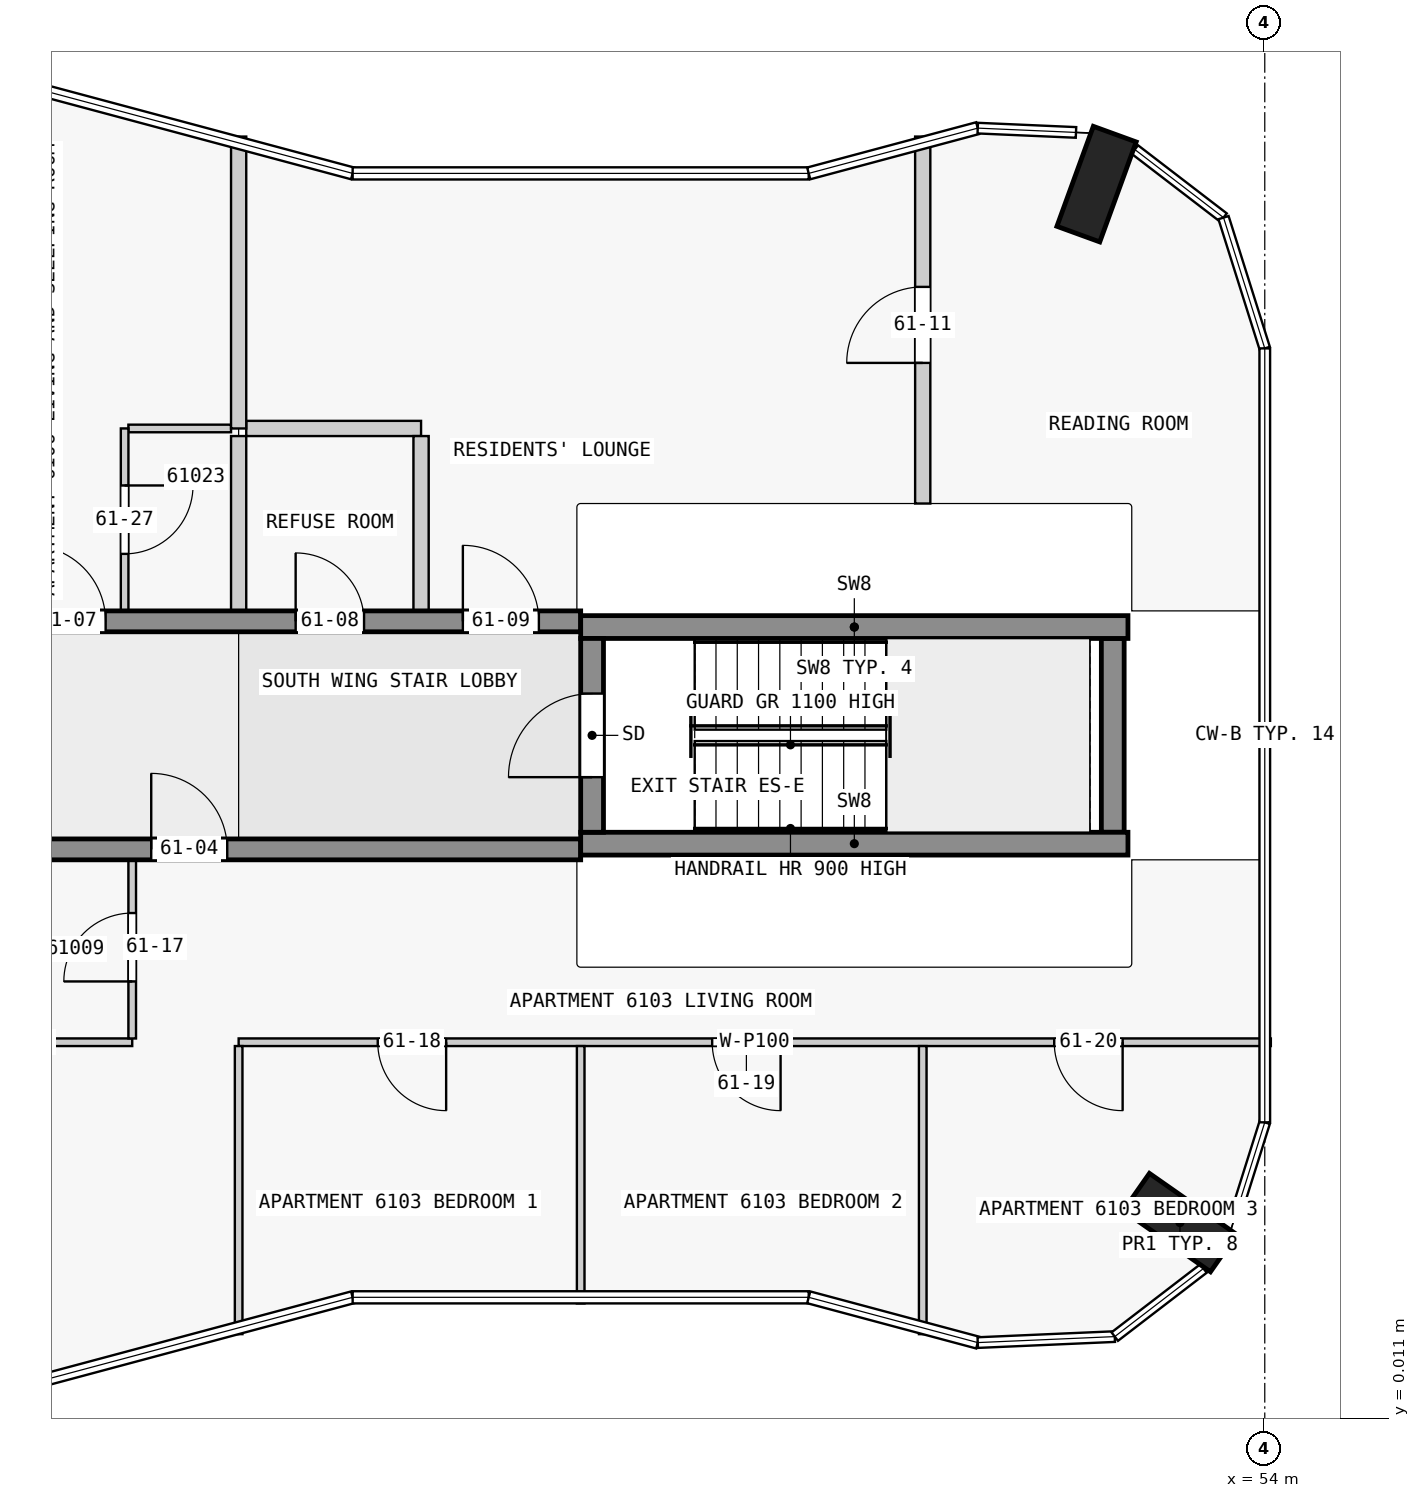
"""IFC4 building model, lengths in metres.
Left out: names, types, materials, properties, quantities, classifications, styles, units other than length and angle.
Written with IfcOpenShell. Run it as: python <this file> out.ifc"""

import sys

from ifc_helpers import new_model, si_unit, direction, frame, frame_2d, origin, origin_2d, place, context, subcontext, project, spatial, rectangle, extrude, element, fill, save


model = new_model("IFC4")
c1 = context("Model", 3, precision=1e-05, world=origin(), true_north=direction((0.0, 1.0)))
c2 = subcontext(c1, "Body", "Model", "MODEL_VIEW")
j1 = project(units=[si_unit("LENGTHUNIT", "METRE"), si_unit("PLANEANGLEUNIT", "RADIAN")], contexts=[c1])
p1 = place(None, origin())
s1 = spatial("IfcSite", under=j1, at=p1, CompositionType="ELEMENT")
p2 = place(p1, origin())
s2 = spatial("IfcBuilding", under=s1, at=p2, CompositionType="ELEMENT")
p3 = place(p2, frame((0.0, 0.0, 232.9)))
s3 = spatial("IfcBuildingStorey", under=s2, at=p3, CompositionType="ELEMENT", Elevation=232.9)
for number, where, z_axis, x_axis in (
    (1, (52.884, 2.59, 0.0), (0.0, 0.0, 1.0), (0.574, 0.819, 0.0)),
    (2, (51.787, 16.252, 0.0), (0.0, 0.0, 1.0), (-0.94, 0.342, 0.0)),
):
    element("IfcColumn", number, at=place(p3, frame(where, z_axis=z_axis, x_axis=x_axis)), inside=s3, PredefinedType="COLUMN", context=c2, shape_type="SweptSolid", body=[
        extrude(rectangle(XDim=0.6, YDim=1.4, at=origin_2d()), origin(), (0.0, 0.0, 1.0), 3.5),
    ])
p4 = place(p3, frame((45.15, 7.725, 0.0), z_axis=(0.0, 0.0, 1.0), x_axis=(0.0, 1.0, 0.0)))
e3 = element("IfcWall", 3, at=p4, inside=s3, PredefinedType="SHEAR", context=c2, shape_type="SweptSolid", body=[
    extrude(rectangle(XDim=2.55, YDim=0.3, at=frame_2d((1.275, 0.0))), origin(), (0.0, 0.0, 1.0), 3.5),
])
p5 = place(p4, frame((0.725, 0.0, 0.0)))
e4 = element("IfcOpeningElement", 4, at=p5, cuts=e3, PredefinedType="OPENING", context=c2, shape_type="SweptSolid", body=[
    extrude(rectangle(XDim=1.1, YDim=2.1, at=frame_2d((0.55, 1.05))), frame((0.0, 0.16, 0.0), z_axis=(0.0, -1.0, 0.0), x_axis=(1.0, 0.0, 0.0)), (0.0, 0.0, 1.0), 0.32),
])
p6 = place(p3, frame((52.0, 7.725, 0.0), z_axis=(0.0, 0.0, 1.0), x_axis=(0.0, 1.0, 0.0)))
e5 = element("IfcWall", 5, at=p6, inside=s3, PredefinedType="SHEAR", context=c2, shape_type="SweptSolid", body=[
    extrude(rectangle(XDim=2.55, YDim=0.3, at=frame_2d((1.275, 0.0))), origin(), (0.0, 0.0, 1.0), 3.5),
])
for number, where, z_axis, x_axis in (
    (6, (45.0, 7.575, 0.0), (0.0, 0.0, 1.0), (1.0, 0.0, 0.0)),
    (7, (45.0, 10.425, 0.0), (0.0, 0.0, 1.0), (1.0, 0.0, 0.0)),
):
    element("IfcWall", number, at=place(p3, frame(where, z_axis=z_axis, x_axis=x_axis)), inside=s3, PredefinedType="SHEAR", context=c2, shape_type="SweptSolid", body=[
        extrude(rectangle(XDim=7.2, YDim=0.3, at=frame_2d((3.6, 0.0))), origin(), (0.0, 0.0, 1.0), 3.5),
    ])
p7 = place(p3, frame((22.5, 7.5, 0.0), z_axis=(0.0, 0.0, 1.0), x_axis=(1.0, 0.0, 0.0)))
e8 = element("IfcWall", 8, at=p7, inside=s3, PredefinedType="SHEAR", context=c2, shape_type="SweptSolid", body=[
    extrude(rectangle(XDim=22.5, YDim=0.275, at=frame_2d((11.25, 0.0))), origin(), (0.0, 0.0, 1.0), 3.2),
])
p8 = place(p7, frame((1.75, 0.0, 0.0)))
e9 = element("IfcOpeningElement", 9, at=p8, cuts=e8, PredefinedType="OPENING", context=c2, shape_type="SweptSolid", body=[
    extrude(rectangle(XDim=1.0, YDim=2.1, at=frame_2d((0.5, 1.05))), frame((0.0, 0.147, 0.0), z_axis=(0.0, -1.0, 0.0), x_axis=(1.0, 0.0, 0.0)), (0.0, 0.0, 1.0), 0.295),
])
p9 = place(p7, frame((5.85, 0.0, 0.0)))
e10 = element("IfcOpeningElement", 10, at=p9, cuts=e8, PredefinedType="OPENING", context=c2, shape_type="SweptSolid", body=[
    extrude(rectangle(XDim=1.8, YDim=2.1, at=frame_2d((0.9, 1.05))), frame((0.0, 0.147, 0.0), z_axis=(0.0, -1.0, 0.0), x_axis=(1.0, 0.0, 0.0)), (0.0, 0.0, 1.0), 0.295),
])
p10 = place(p7, frame((10.75, 0.0, 0.0)))
e11 = element("IfcOpeningElement", 11, at=p10, cuts=e8, PredefinedType="OPENING", context=c2, shape_type="SweptSolid", body=[
    extrude(rectangle(XDim=1.0, YDim=2.1, at=frame_2d((0.5, 1.05))), frame((0.0, 0.147, 0.0), z_axis=(0.0, -1.0, 0.0), x_axis=(1.0, 0.0, 0.0)), (0.0, 0.0, 1.0), 0.295),
])
p11 = place(p7, frame((16.85, 0.0, 0.0)))
e12 = element("IfcOpeningElement", 12, at=p11, cuts=e8, PredefinedType="OPENING", context=c2, shape_type="SweptSolid", body=[
    extrude(rectangle(XDim=1.0, YDim=2.1, at=frame_2d((0.5, 1.05))), frame((0.0, 0.147, 0.0), z_axis=(0.0, -1.0, 0.0), x_axis=(1.0, 0.0, 0.0)), (0.0, 0.0, 1.0), 0.295),
])
p12 = place(p3, frame((22.5, 10.5, 0.0), z_axis=(0.0, 0.0, 1.0), x_axis=(1.0, 0.0, 0.0)))
e13 = element("IfcWall", 13, at=p12, inside=s3, PredefinedType="SHEAR", context=c2, shape_type="SweptSolid", body=[
    extrude(rectangle(XDim=22.5, YDim=0.275, at=frame_2d((11.25, 0.0))), origin(), (0.0, 0.0, 1.0), 3.2),
])
p13 = place(p12, frame((4.05, 0.0, 0.0)))
e14 = element("IfcOpeningElement", 14, at=p13, cuts=e13, PredefinedType="OPENING", context=c2, shape_type="SweptSolid", body=[
    extrude(rectangle(XDim=1.0, YDim=2.1, at=frame_2d((0.5, 1.05))), frame((0.0, 0.147, 0.0), z_axis=(0.0, -1.0, 0.0), x_axis=(1.0, 0.0, 0.0)), (0.0, 0.0, 1.0), 0.295),
])
p14 = place(p12, frame((10.75, 0.0, 0.0)))
e15 = element("IfcOpeningElement", 15, at=p14, cuts=e13, PredefinedType="OPENING", context=c2, shape_type="SweptSolid", body=[
    extrude(rectangle(XDim=1.0, YDim=2.1, at=frame_2d((0.5, 1.05))), frame((0.0, 0.147, 0.0), z_axis=(0.0, -1.0, 0.0), x_axis=(1.0, 0.0, 0.0)), (0.0, 0.0, 1.0), 0.295),
])
p15 = place(p12, frame((15.25, 0.0, 0.0)))
e16 = element("IfcOpeningElement", 16, at=p15, cuts=e13, PredefinedType="OPENING", context=c2, shape_type="SweptSolid", body=[
    extrude(rectangle(XDim=1.0, YDim=2.1, at=frame_2d((0.5, 1.05))), frame((0.0, 0.147, 0.0), z_axis=(0.0, -1.0, 0.0), x_axis=(1.0, 0.0, 0.0)), (0.0, 0.0, 1.0), 0.295),
])
p16 = place(p12, frame((18.75, 0.0, 0.0)))
e17 = element("IfcOpeningElement", 17, at=p16, cuts=e13, PredefinedType="OPENING", context=c2, shape_type="SweptSolid", body=[
    extrude(rectangle(XDim=0.9, YDim=2.1, at=frame_2d((0.45, 1.05))), frame((0.0, 0.147, 0.0), z_axis=(0.0, -1.0, 0.0), x_axis=(1.0, 0.0, 0.0)), (0.0, 0.0, 1.0), 0.295),
])
p17 = place(p12, frame((20.95, 0.0, 0.0)))
e18 = element("IfcOpeningElement", 18, at=p17, cuts=e13, PredefinedType="OPENING", context=c2, shape_type="SweptSolid", body=[
    extrude(rectangle(XDim=1.0, YDim=2.1, at=frame_2d((0.5, 1.05))), frame((0.0, 0.147, 0.0), z_axis=(0.0, -1.0, 0.0), x_axis=(1.0, 0.0, 0.0)), (0.0, 0.0, 1.0), 0.295),
])
p18 = place(p3, frame((54.08, 4.962, 0.0), z_axis=(0.0, 0.0, 1.0), x_axis=(-1.0, 0.0, 0.0)))
e19 = element("IfcWall", 19, at=p18, inside=s3, PredefinedType="PARTITIONING", context=c2, shape_type="SweptSolid", body=[
    extrude(rectangle(XDim=13.58, YDim=0.1, at=frame_2d((6.79, 0.0))), origin(), (0.0, 0.0, 1.0), 3.2),
])
p19 = place(p18, frame((10.85, 0.0, 0.0)))
e20 = element("IfcOpeningElement", 20, at=p19, cuts=e19, PredefinedType="OPENING", context=c2, shape_type="SweptSolid", body=[
    extrude(rectangle(XDim=0.9, YDim=2.1, at=frame_2d((0.45, 1.05))), frame((0.0, 0.06, 0.0), z_axis=(0.0, -1.0, 0.0), x_axis=(1.0, 0.0, 0.0)), (0.0, 0.0, 1.0), 0.12),
])
p20 = place(p18, frame((6.45, 0.0, 0.0)))
e21 = element("IfcOpeningElement", 21, at=p20, cuts=e19, PredefinedType="OPENING", context=c2, shape_type="SweptSolid", body=[
    extrude(rectangle(XDim=0.9, YDim=2.1, at=frame_2d((0.45, 1.05))), frame((0.0, 0.06, 0.0), z_axis=(0.0, -1.0, 0.0), x_axis=(1.0, 0.0, 0.0)), (0.0, 0.0, 1.0), 0.12),
])
p21 = place(p18, frame((1.95, 0.0, 0.0)))
e22 = element("IfcOpeningElement", 22, at=p21, cuts=e19, PredefinedType="OPENING", context=c2, shape_type="SweptSolid", body=[
    extrude(rectangle(XDim=0.9, YDim=2.1, at=frame_2d((0.45, 1.05))), frame((0.0, 0.06, 0.0), z_axis=(0.0, -1.0, 0.0), x_axis=(1.0, 0.0, 0.0)), (0.0, 0.0, 1.0), 0.12),
])
p22 = place(p3, frame((36.1, 4.962, 0.0), z_axis=(0.0, 0.0, 1.0), x_axis=(1.0, 0.0, 0.0)))
e23 = element("IfcWall", 23, at=p22, inside=s3, PredefinedType="PARTITIONING", context=c2, shape_type="SweptSolid", body=[
    extrude(rectangle(XDim=3.0, YDim=0.1, at=frame_2d((1.5, 0.0))), origin(), (0.0, 0.0, 1.0), 3.2),
])
p23 = place(p22, frame((0.35, 0.0, 0.0)))
e24 = element("IfcOpeningElement", 24, at=p23, cuts=e23, PredefinedType="OPENING", context=c2, shape_type="SweptSolid", body=[
    extrude(rectangle(XDim=0.9, YDim=2.1, at=frame_2d((0.45, 1.05))), frame((0.0, 0.06, 0.0), z_axis=(0.0, -1.0, 0.0), x_axis=(1.0, 0.0, 0.0)), (0.0, 0.0, 1.0), 0.12),
])
p24 = place(p3, frame((40.4, 13.038, 0.0), z_axis=(0.0, 0.0, 1.0), x_axis=(-1.0, 0.0, 0.0)))
e25 = element("IfcWall", 25, at=p24, inside=s3, PredefinedType="PARTITIONING", context=c2, shape_type="SweptSolid", body=[
    extrude(rectangle(XDim=1.35, YDim=0.1, at=frame_2d((0.675, 0.0))), origin(), (0.0, 0.0, 1.0), 3.2),
])
p25 = place(p3, frame((42.9, 13.038, 0.0), z_axis=(0.0, 0.0, 1.0), x_axis=(-1.0, 0.0, 0.0)))
e26 = element("IfcWall", 26, at=p25, inside=s3, PredefinedType="PARTITIONING", context=c2, shape_type="SweptSolid", body=[
    extrude(rectangle(XDim=2.3, YDim=0.2, at=frame_2d((1.15, 0.0))), origin(), (0.0, 0.0, 1.0), 3.2),
])
p26 = place(p3, frame((39.0, 13.038, 0.0), z_axis=(0.0, 0.0, 1.0), x_axis=(0.0, -1.0, 0.0)))
e27 = element("IfcWall", 27, at=p26, inside=s3, PredefinedType="PARTITIONING", context=c2, shape_type="SweptSolid", body=[
    extrude(rectangle(XDim=2.4, YDim=0.1, at=frame_2d((1.2, 0.0))), origin(), (0.0, 0.0, 1.0), 3.2),
])
p27 = place(p26, frame((0.75, 0.0, 0.0)))
e28 = element("IfcOpeningElement", 28, at=p27, cuts=e27, PredefinedType="OPENING", context=c2, shape_type="SweptSolid", body=[
    extrude(rectangle(XDim=0.9, YDim=2.1, at=frame_2d((0.45, 1.05))), frame((0.0, 0.06, 0.0), z_axis=(0.0, -1.0, 0.0), x_axis=(1.0, 0.0, 0.0)), (0.0, 0.0, 1.0), 0.12),
])
p28 = place(p3, frame((39.1, 5.012, 0.0), z_axis=(0.0, 0.0, 1.0), x_axis=(0.0, 1.0, 0.0)))
e29 = element("IfcWall", 29, at=p28, inside=s3, PredefinedType="PARTITIONING", context=c2, shape_type="SweptSolid", body=[
    extrude(rectangle(XDim=2.35, YDim=0.1, at=frame_2d((1.175, 0.0))), origin(), (0.0, 0.0, 1.0), 3.2),
])
p29 = place(p28, frame((0.75, 0.0, 0.0)))
e30 = element("IfcOpeningElement", 30, at=p29, cuts=e29, PredefinedType="OPENING", context=c2, shape_type="SweptSolid", body=[
    extrude(rectangle(XDim=0.9, YDim=2.1, at=frame_2d((0.45, 1.05))), frame((0.0, 0.06, 0.0), z_axis=(0.0, -1.0, 0.0), x_axis=(1.0, 0.0, 0.0)), (0.0, 0.0, 1.0), 0.12),
])
p30 = place(p3, frame((40.5, 4.913, 0.0), z_axis=(0.0, 0.0, 1.0), x_axis=(0.0, -1.0, 0.0)))
e31 = element("IfcWall", 31, at=p30, inside=s3, PredefinedType="PARTITIONING", context=c2, shape_type="SweptSolid", body=[
    extrude(rectangle(XDim=3.79, YDim=0.1, at=frame_2d((1.895, 0.0))), origin(), (0.0, 0.0, 1.0), 3.2),
])
p31 = place(p3, frame((40.5, 16.878, 0.0), z_axis=(0.0, 0.0, 1.0), x_axis=(0.0, -1.0, 0.0)))
e32 = element("IfcWall", 32, at=p31, inside=s3, PredefinedType="PARTITIONING", context=c2, shape_type="SweptSolid", body=[
    extrude(rectangle(XDim=3.84, YDim=0.2, at=frame_2d((1.92, 0.0))), origin(), (0.0, 0.0, 1.0), 3.2),
])
for number, where, z_axis, x_axis in (
    (33, (40.5, 10.637, 0.0), (0.0, 0.0, 1.0), (0.0, 1.0, 0.0)),
    (34, (42.9, 10.637, 0.0), (0.0, 0.0, 1.0), (0.0, 1.0, 0.0)),
):
    element("IfcWall", number, at=place(p3, frame(where, z_axis=z_axis, x_axis=x_axis)), inside=s3, PredefinedType="PARTITIONING", context=c2, shape_type="SweptSolid", body=[
        extrude(rectangle(XDim=2.3, YDim=0.2, at=frame_2d((1.15, 0.0))), origin(), (0.0, 0.0, 1.0), 3.2),
    ])
p32 = place(p3, frame((45.0, 1.527, 0.0), z_axis=(0.0, 0.0, 1.0), x_axis=(0.0, 1.0, 0.0)))
e35 = element("IfcWall", 35, at=p32, inside=s3, PredefinedType="PARTITIONING", context=c2, shape_type="SweptSolid", body=[
    extrude(rectangle(XDim=3.386, YDim=0.1, at=frame_2d((1.693, 0.0))), origin(), (0.0, 0.0, 1.0), 3.2),
])
p33 = place(p3, frame((49.5, 1.122, 0.0), z_axis=(0.0, 0.0, 1.0), x_axis=(0.0, 1.0, 0.0)))
e36 = element("IfcWall", 36, at=p33, inside=s3, PredefinedType="PARTITIONING", context=c2, shape_type="SweptSolid", body=[
    extrude(rectangle(XDim=3.79, YDim=0.1, at=frame_2d((1.895, 0.0))), origin(), (0.0, 0.0, 1.0), 3.2),
])
p34 = place(p3, frame((49.5, 12.05, 0.0), z_axis=(0.0, 0.0, 1.0), x_axis=(0.0, 1.0, 0.0)))
e37 = element("IfcWall", 37, at=p34, inside=s3, PredefinedType="PARTITIONING", context=c2, shape_type="SweptSolid", body=[
    extrude(rectangle(XDim=4.828, YDim=0.2, at=frame_2d((2.414, 0.0))), origin(), (0.0, 0.0, 1.0), 3.2),
])
p35 = place(p34, frame((1.85, 0.0, 0.0)))
e38 = element("IfcOpeningElement", 38, at=p35, cuts=e37, PredefinedType="OPENING", context=c2, shape_type="SweptSolid", body=[
    extrude(rectangle(XDim=1.0, YDim=2.1, at=frame_2d((0.5, 1.05))), frame((0.0, 0.11, 0.0), z_axis=(0.0, -1.0, 0.0), x_axis=(1.0, 0.0, 0.0)), (0.0, 0.0, 1.0), 0.22),
])
p36 = place(p5, origin())
e39 = element("IfcDoor", 39, at=p36, inside=s3, OperationType="SINGLE_SWING_LEFT", PredefinedType="DOOR", context=c2, shape_type="SweptSolid", body=[
    extrude(rectangle(XDim=1.1, YDim=2.1, at=frame_2d((0.55, 1.05))), frame((0.0, 0.025, 0.0), z_axis=(0.0, -1.0, 0.0), x_axis=(1.0, 0.0, 0.0)), (0.0, 0.0, 1.0), 0.05),
])
fill(e4, e39)
p37 = place(p11, origin())
e40 = element("IfcDoor", 40, at=p37, inside=s3, OperationType="SINGLE_SWING_RIGHT", PredefinedType="DOOR", context=c2, shape_type="SweptSolid", body=[
    extrude(rectangle(XDim=1.0, YDim=2.1, at=frame_2d((0.5, 1.05))), frame((0.0, 0.025, 0.0), z_axis=(0.0, -1.0, 0.0), x_axis=(1.0, 0.0, 0.0)), (0.0, 0.0, 1.0), 0.05),
])
fill(e12, e40)
p38 = place(p15, origin())
e41 = element("IfcDoor", 41, at=p38, inside=s3, OperationType="SINGLE_SWING_RIGHT", PredefinedType="DOOR", context=c2, shape_type="SweptSolid", body=[
    extrude(rectangle(XDim=1.0, YDim=2.1, at=frame_2d((0.5, 1.05))), frame((0.0, 0.025, 0.0), z_axis=(0.0, -1.0, 0.0), x_axis=(1.0, 0.0, 0.0)), (0.0, 0.0, 1.0), 0.05),
])
fill(e16, e41)
p39 = place(p16, origin())
e42 = element("IfcDoor", 42, at=p39, inside=s3, OperationType="SINGLE_SWING_RIGHT", PredefinedType="DOOR", context=c2, shape_type="SweptSolid", body=[
    extrude(rectangle(XDim=0.9, YDim=2.1, at=frame_2d((0.45, 1.05))), frame((0.0, 0.025, 0.0), z_axis=(0.0, -1.0, 0.0), x_axis=(1.0, 0.0, 0.0)), (0.0, 0.0, 1.0), 0.05),
])
fill(e17, e42)
p40 = place(p17, origin())
e43 = element("IfcDoor", 43, at=p40, inside=s3, OperationType="SINGLE_SWING_RIGHT", PredefinedType="DOOR", context=c2, shape_type="SweptSolid", body=[
    extrude(rectangle(XDim=1.0, YDim=2.1, at=frame_2d((0.5, 1.05))), frame((0.0, 0.025, 0.0), z_axis=(0.0, -1.0, 0.0), x_axis=(1.0, 0.0, 0.0)), (0.0, 0.0, 1.0), 0.05),
])
fill(e18, e43)
p41 = place(p35, origin())
e44 = element("IfcDoor", 44, at=p41, inside=s3, OperationType="SINGLE_SWING_LEFT", PredefinedType="DOOR", context=c2, shape_type="SweptSolid", body=[
    extrude(rectangle(XDim=1.0, YDim=2.1, at=frame_2d((0.5, 1.05))), frame((0.0, 0.025, 0.0), z_axis=(0.0, -1.0, 0.0), x_axis=(1.0, 0.0, 0.0)), (0.0, 0.0, 1.0), 0.05),
])
fill(e38, e44)
p42 = place(p29, origin())
e45 = element("IfcDoor", 45, at=p42, inside=s3, OperationType="SINGLE_SWING_RIGHT", PredefinedType="DOOR", context=c2, shape_type="SweptSolid", body=[
    extrude(rectangle(XDim=0.9, YDim=2.1, at=frame_2d((0.45, 1.05))), frame((0.0, 0.025, 0.0), z_axis=(0.0, -1.0, 0.0), x_axis=(1.0, 0.0, 0.0)), (0.0, 0.0, 1.0), 0.05),
])
fill(e30, e45)
p43 = place(p19, origin())
e46 = element("IfcDoor", 46, at=p43, inside=s3, OperationType="SINGLE_SWING_RIGHT", PredefinedType="DOOR", context=c2, shape_type="SweptSolid", body=[
    extrude(rectangle(XDim=0.9, YDim=2.1, at=frame_2d((0.45, 1.05))), frame((0.0, 0.025, 0.0), z_axis=(0.0, -1.0, 0.0), x_axis=(1.0, 0.0, 0.0)), (0.0, 0.0, 1.0), 0.05),
])
fill(e20, e46)
p44 = place(p20, origin())
e47 = element("IfcDoor", 47, at=p44, inside=s3, OperationType="SINGLE_SWING_RIGHT", PredefinedType="DOOR", context=c2, shape_type="SweptSolid", body=[
    extrude(rectangle(XDim=0.9, YDim=2.1, at=frame_2d((0.45, 1.05))), frame((0.0, 0.025, 0.0), z_axis=(0.0, -1.0, 0.0), x_axis=(1.0, 0.0, 0.0)), (0.0, 0.0, 1.0), 0.05),
])
fill(e21, e47)
p45 = place(p21, origin())
e48 = element("IfcDoor", 48, at=p45, inside=s3, OperationType="SINGLE_SWING_LEFT", PredefinedType="DOOR", context=c2, shape_type="SweptSolid", body=[
    extrude(rectangle(XDim=0.9, YDim=2.1, at=frame_2d((0.45, 1.05))), frame((0.0, 0.025, 0.0), z_axis=(0.0, -1.0, 0.0), x_axis=(1.0, 0.0, 0.0)), (0.0, 0.0, 1.0), 0.05),
])
fill(e22, e48)
p46 = place(p27, origin())
e49 = element("IfcDoor", 49, at=p46, inside=s3, OperationType="SINGLE_SWING_LEFT", PredefinedType="DOOR", context=c2, shape_type="SweptSolid", body=[
    extrude(rectangle(XDim=0.9, YDim=2.1, at=frame_2d((0.45, 1.05))), frame((0.0, 0.025, 0.0), z_axis=(0.0, -1.0, 0.0), x_axis=(1.0, 0.0, 0.0)), (0.0, 0.0, 1.0), 0.05),
])
fill(e28, e49)
save(model, sys.argv[1])
